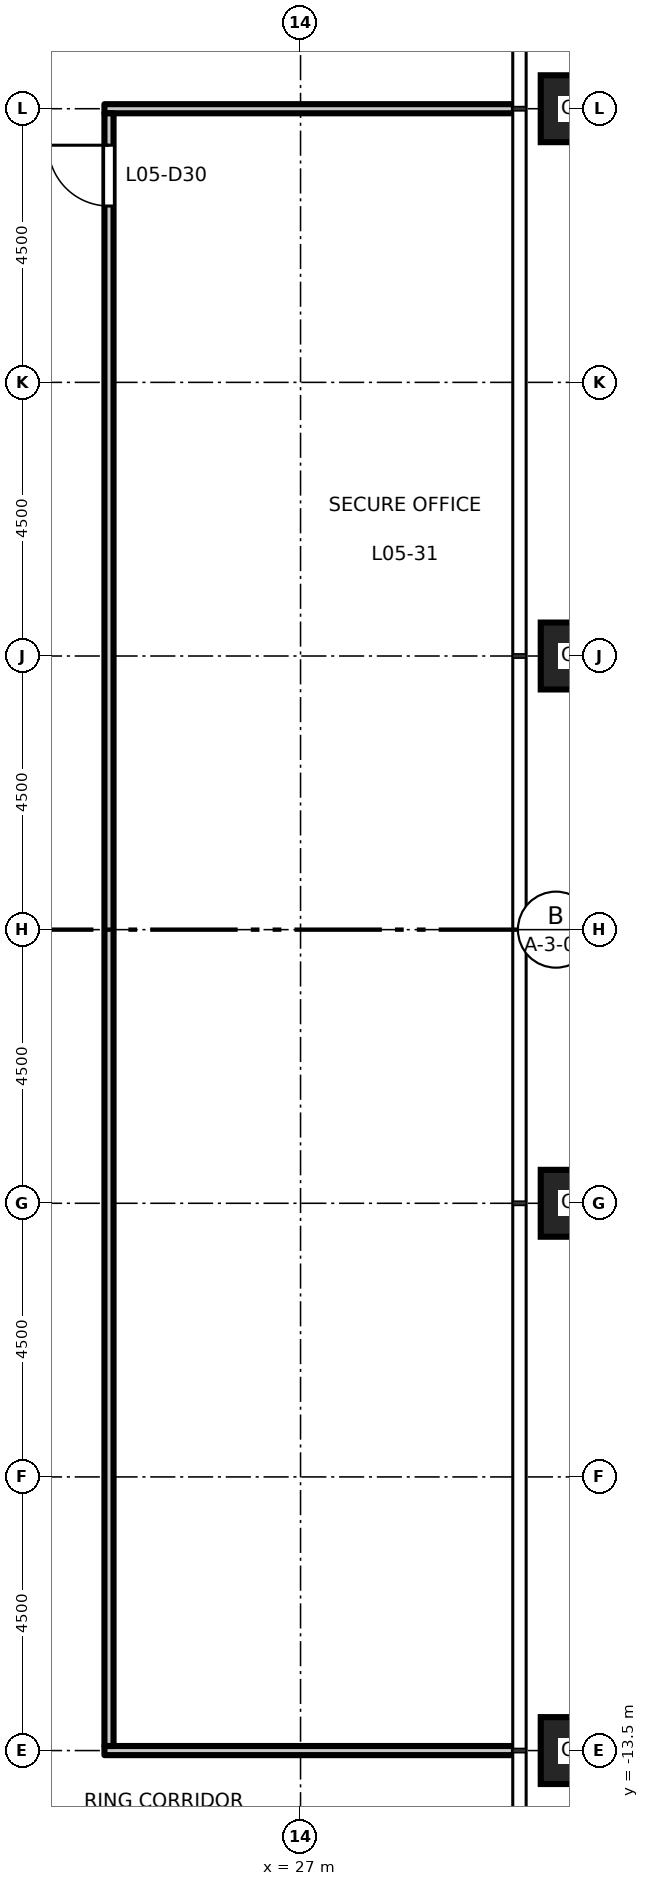
"""IFC4 building model, lengths in metres.
Left out: names, types, materials, properties, quantities, classifications, styles, units other than length and angle.
Written with IfcOpenShell. Run it as: python <this file> out.ifc"""

import sys

from ifc_helpers import new_model, si_unit, direction, frame, frame_2d, origin, origin_2d, place, context, subcontext, project, spatial, rectangle, hollow_rectangle, extrude, element, fill, save


model = new_model("IFC4")
c1 = context("Model", 3, precision=1e-05, world=origin(), true_north=direction((0.0, 1.0)))
c2 = subcontext(c1, "Body", "Model", "MODEL_VIEW")
j1 = project(units=[si_unit("LENGTHUNIT", "METRE"), si_unit("PLANEANGLEUNIT", "RADIAN")], contexts=[c1])
p1 = place(None, origin())
s1 = spatial("IfcSite", under=j1, at=p1, CompositionType="ELEMENT")
p2 = place(p1, origin())
s2 = spatial("IfcBuilding", under=s1, at=p2, CompositionType="ELEMENT")
p3 = place(p2, frame((0.0, 0.0, 26.7)))
s3 = spatial("IfcBuildingStorey", under=s2, at=p3, CompositionType="ELEMENT", Elevation=26.7)
for number, where, z_axis, x_axis in (
    (1, (31.5, -13.5, 0.0), (0.0, 0.0, 1.0), (1.0, 0.0, 0.0)),
    (2, (31.5, -4.5, 0.0), (0.0, 0.0, 1.0), (1.0, 0.0, 0.0)),
    (3, (31.5, 4.5, 0.0), (0.0, 0.0, 1.0), (1.0, 0.0, 0.0)),
    (4, (31.5, 13.5, 0.0), (0.0, 0.0, 1.0), (1.0, 0.0, 0.0)),
):
    element("IfcColumn", number, at=place(p3, frame(where, z_axis=z_axis, x_axis=x_axis)), inside=s3, PredefinedType="COLUMN", context=c2, shape_type="SweptSolid", body=[
        extrude(hollow_rectangle(XDim=1.1, YDim=1.1, WallThickness=0.07, at=origin_2d()), origin(), (0.0, 0.0, 1.0), 4.5),
    ])
for number, where, z_axis, x_axis in (
    (5, (23.775, -13.5, 0.0), (0.0, 0.0, 1.0), (1.0, 0.0, 0.0)),
    (6, (23.775, 13.5, 0.0), (0.0, 0.0, 1.0), (1.0, 0.0, 0.0)),
):
    element("IfcWall", number, at=place(p3, frame(where, z_axis=z_axis, x_axis=x_axis)), inside=s3, PredefinedType="PARTITIONING", context=c2, shape_type="SweptSolid", body=[
        extrude(rectangle(XDim=6.735, YDim=0.15, at=frame_2d((3.368, 0.0))), origin(), (0.0, 0.0, 1.0), 3.35),
    ])
p4 = place(p3, frame((23.85, -13.425, 0.0), z_axis=(0.0, 0.0, 1.0), x_axis=(0.0, 1.0, 0.0)))
e7 = element("IfcWall", 7, at=p4, inside=s3, PredefinedType="PARTITIONING", context=c2, shape_type="SweptSolid", body=[
    extrude(rectangle(XDim=26.85, YDim=0.15, at=frame_2d((13.425, 0.0))), origin(), (0.0, 0.0, 1.0), 4.35),
])
p5 = place(p4, frame((25.325, 0.0, 0.0)))
e8 = element("IfcOpeningElement", 8, at=p5, cuts=e7, PredefinedType="OPENING", context=c2, shape_type="SweptSolid", body=[
    extrude(rectangle(XDim=1.0, YDim=2.1, at=frame_2d((0.5, 1.05))), frame((0.0, 0.085, 0.0), z_axis=(0.0, -1.0, 0.0), x_axis=(1.0, 0.0, 0.0)), (0.0, 0.0, 1.0), 0.17),
])
p6 = place(p5, origin())
e9 = element("IfcDoor", 9, at=p6, inside=s3, OperationType="SINGLE_SWING_RIGHT", PredefinedType="DOOR", context=c2, shape_type="SweptSolid", body=[
    extrude(rectangle(XDim=1.0, YDim=2.1, at=frame_2d((0.5, 1.05))), frame((0.0, 0.025, 0.0), z_axis=(0.0, -1.0, 0.0), x_axis=(1.0, 0.0, 0.0)), (0.0, 0.0, 1.0), 0.05),
])
fill(e8, e9)
save(model, sys.argv[1])
